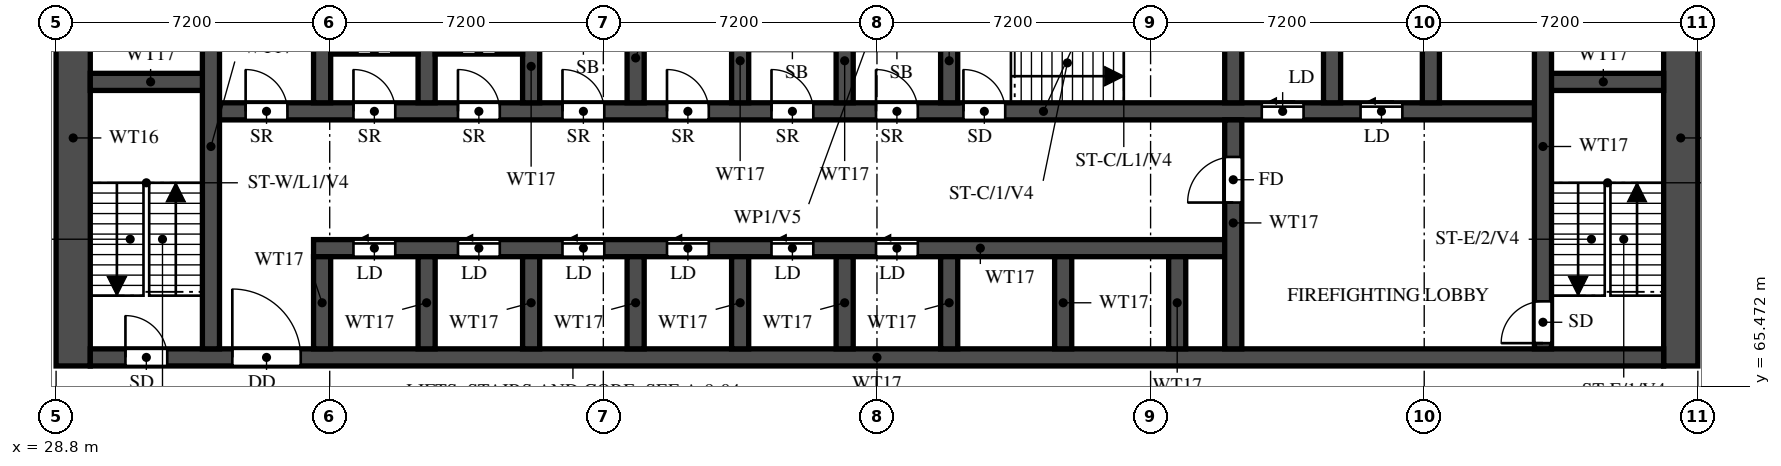
"""IFC4 building model, lengths in metres.
Left out: names, types, materials, properties, quantities, classifications, styles, units other than length and angle.
Written with IfcOpenShell. Run it as: python <this file> out.ifc"""

import sys

from ifc_helpers import new_model, si_unit, direction, frame, frame_2d, origin, place, context, subcontext, project, spatial, rectangle, extrude, element, fill, save


model = new_model("IFC4")
c1 = context("Model", 3, precision=1e-05, world=origin(), true_north=direction((0.0, 1.0)))
c2 = subcontext(c1, "Body", "Model", "MODEL_VIEW")
j1 = project(units=[si_unit("LENGTHUNIT", "METRE"), si_unit("PLANEANGLEUNIT", "RADIAN")], contexts=[c1])
p1 = place(None, origin())
s1 = spatial("IfcSite", under=j1, at=p1, CompositionType="ELEMENT")
p2 = place(p1, origin())
s2 = spatial("IfcBuilding", under=s1, at=p2, CompositionType="ELEMENT")
p3 = place(p2, frame((0.0, 0.0, 13.2)))
s3 = spatial("IfcBuildingStorey", under=s2, at=p3, CompositionType="ELEMENT", Elevation=13.2)
for number, where, z_axis, x_axis in (
    (1, (29.25, 66.0, 0.0), (0.0, 0.0, 1.0), (0.0, 1.0, 0.0)),
    (2, (71.55, 66.0, 0.0), (0.0, 0.0, 1.0), (0.0, 1.0, 0.0)),
):
    element("IfcWall", number, at=place(p3, frame(where, z_axis=z_axis, x_axis=x_axis)), inside=s3, PredefinedType="SHEAR", context=c2, shape_type="SweptSolid", body=[
        extrude(rectangle(XDim=12.0, YDim=0.9, at=frame_2d((6.0, 0.0))), origin(), (0.0, 0.0, 1.0), 3.8),
    ])
p4 = place(p3, frame((29.7, 66.225, 0.0), z_axis=(0.0, 0.0, 1.0), x_axis=(1.0, 0.0, 0.0)))
e3 = element("IfcWall", 3, at=p4, inside=s3, PredefinedType="SHEAR", context=c2, shape_type="SweptSolid", body=[
    extrude(rectangle(XDim=41.4, YDim=0.45, at=frame_2d((20.7, 0.0))), origin(), (0.0, 0.0, 1.0), 3.8),
])
p5 = place(p4, frame((0.925, 0.0, 0.0)))
e4 = element("IfcOpeningElement", 4, at=p5, cuts=e3, PredefinedType="OPENING", context=c2, shape_type="SweptSolid", body=[
    extrude(rectangle(XDim=1.1, YDim=2.1, at=frame_2d((0.55, 1.05))), frame((0.0, 0.235, 0.0), z_axis=(0.0, -1.0, 0.0), x_axis=(1.0, 0.0, 0.0)), (0.0, 0.0, 1.0), 0.47),
])
p6 = place(p4, frame((3.738, 0.0, 0.0)))
e5 = element("IfcOpeningElement", 5, at=p6, cuts=e3, PredefinedType="OPENING", context=c2, shape_type="SweptSolid", body=[
    extrude(rectangle(XDim=1.8, YDim=2.1, at=frame_2d((0.9, 1.05))), frame((0.0, 0.235, 0.0), z_axis=(0.0, -1.0, 0.0), x_axis=(1.0, 0.0, 0.0)), (0.0, 0.0, 1.0), 0.47),
])
p7 = place(p3, frame((35.575, 69.1, 0.0), z_axis=(0.0, 0.0, 1.0), x_axis=(1.0, 0.0, 0.0)))
e6 = element("IfcWall", 6, at=p7, inside=s3, PredefinedType="SHEAR", context=c2, shape_type="SweptSolid", body=[
    extrude(rectangle(XDim=24.2, YDim=0.45, at=frame_2d((12.1, 0.0))), origin(), (0.0, 0.0, 1.0), 3.8),
])
p8 = place(p7, frame((1.05, 0.0, 0.0)))
e7 = element("IfcOpeningElement", 7, at=p8, cuts=e6, PredefinedType="OPENING", context=c2, shape_type="SweptSolid", body=[
    extrude(rectangle(XDim=1.1, YDim=2.1, at=frame_2d((0.55, 1.05))), frame((0.0, 0.235, 0.0), z_axis=(0.0, -1.0, 0.0), x_axis=(1.0, 0.0, 0.0)), (0.0, 0.0, 1.0), 0.47),
])
p9 = place(p7, frame((3.8, 0.0, 0.0)))
e8 = element("IfcOpeningElement", 8, at=p9, cuts=e6, PredefinedType="OPENING", context=c2, shape_type="SweptSolid", body=[
    extrude(rectangle(XDim=1.1, YDim=2.1, at=frame_2d((0.55, 1.05))), frame((0.0, 0.235, 0.0), z_axis=(0.0, -1.0, 0.0), x_axis=(1.0, 0.0, 0.0)), (0.0, 0.0, 1.0), 0.47),
])
p10 = place(p7, frame((6.55, 0.0, 0.0)))
e9 = element("IfcOpeningElement", 9, at=p10, cuts=e6, PredefinedType="OPENING", context=c2, shape_type="SweptSolid", body=[
    extrude(rectangle(XDim=1.1, YDim=2.1, at=frame_2d((0.55, 1.05))), frame((0.0, 0.235, 0.0), z_axis=(0.0, -1.0, 0.0), x_axis=(1.0, 0.0, 0.0)), (0.0, 0.0, 1.0), 0.47),
])
p11 = place(p7, frame((9.3, 0.0, 0.0)))
e10 = element("IfcOpeningElement", 10, at=p11, cuts=e6, PredefinedType="OPENING", context=c2, shape_type="SweptSolid", body=[
    extrude(rectangle(XDim=1.1, YDim=2.1, at=frame_2d((0.55, 1.05))), frame((0.0, 0.235, 0.0), z_axis=(0.0, -1.0, 0.0), x_axis=(1.0, 0.0, 0.0)), (0.0, 0.0, 1.0), 0.47),
])
p12 = place(p7, frame((12.05, 0.0, 0.0)))
e11 = element("IfcOpeningElement", 11, at=p12, cuts=e6, PredefinedType="OPENING", context=c2, shape_type="SweptSolid", body=[
    extrude(rectangle(XDim=1.1, YDim=2.1, at=frame_2d((0.55, 1.05))), frame((0.0, 0.235, 0.0), z_axis=(0.0, -1.0, 0.0), x_axis=(1.0, 0.0, 0.0)), (0.0, 0.0, 1.0), 0.47),
])
p13 = place(p7, frame((14.8, 0.0, 0.0)))
e12 = element("IfcOpeningElement", 12, at=p13, cuts=e6, PredefinedType="OPENING", context=c2, shape_type="SweptSolid", body=[
    extrude(rectangle(XDim=1.1, YDim=2.1, at=frame_2d((0.55, 1.05))), frame((0.0, 0.235, 0.0), z_axis=(0.0, -1.0, 0.0), x_axis=(1.0, 0.0, 0.0)), (0.0, 0.0, 1.0), 0.47),
])
p14 = place(p3, frame((32.875, 72.7, 0.0), z_axis=(0.0, 0.0, 1.0), x_axis=(1.0, 0.0, 0.0)))
e13 = element("IfcWall", 13, at=p14, inside=s3, PredefinedType="SHEAR", context=c2, shape_type="SweptSolid", body=[
    extrude(rectangle(XDim=35.05, YDim=0.45, at=frame_2d((17.525, 0.0))), origin(), (0.0, 0.0, 1.0), 3.8),
])
p15 = place(p14, frame((19.8, 0.0, 0.0)))
e14 = element("IfcOpeningElement", 14, at=p15, cuts=e13, PredefinedType="OPENING", context=c2, shape_type="SweptSolid", body=[
    extrude(rectangle(XDim=1.1, YDim=2.1, at=frame_2d((0.55, 1.05))), frame((0.0, 0.235, 0.0), z_axis=(0.0, -1.0, 0.0), x_axis=(1.0, 0.0, 0.0)), (0.0, 0.0, 1.0), 0.47),
])
p16 = place(p14, frame((27.65, 0.0, 0.0)))
e15 = element("IfcOpeningElement", 15, at=p16, cuts=e13, PredefinedType="OPENING", context=c2, shape_type="SweptSolid", body=[
    extrude(rectangle(XDim=1.1, YDim=2.1, at=frame_2d((0.55, 1.05))), frame((0.0, 0.235, 0.0), z_axis=(0.0, -1.0, 0.0), x_axis=(1.0, 0.0, 0.0)), (0.0, 0.0, 1.0), 0.47),
])
p17 = place(p14, frame((30.25, 0.0, 0.0)))
e16 = element("IfcOpeningElement", 16, at=p17, cuts=e13, PredefinedType="OPENING", context=c2, shape_type="SweptSolid", body=[
    extrude(rectangle(XDim=1.1, YDim=2.1, at=frame_2d((0.55, 1.05))), frame((0.0, 0.235, 0.0), z_axis=(0.0, -1.0, 0.0), x_axis=(1.0, 0.0, 0.0)), (0.0, 0.0, 1.0), 0.47),
])
p18 = place(p14, frame((3.75, 0.0, 0.0)))
e17 = element("IfcOpeningElement", 17, at=p18, cuts=e13, PredefinedType="OPENING", context=c2, shape_type="SweptSolid", body=[
    extrude(rectangle(XDim=1.1, YDim=2.1, at=frame_2d((0.55, 1.05))), frame((0.0, 0.235, 0.0), z_axis=(0.0, -1.0, 0.0), x_axis=(1.0, 0.0, 0.0)), (0.0, 0.0, 1.0), 0.47),
])
p19 = place(p14, frame((6.5, 0.0, 0.0)))
e18 = element("IfcOpeningElement", 18, at=p19, cuts=e13, PredefinedType="OPENING", context=c2, shape_type="SweptSolid", body=[
    extrude(rectangle(XDim=1.1, YDim=2.1, at=frame_2d((0.55, 1.05))), frame((0.0, 0.235, 0.0), z_axis=(0.0, -1.0, 0.0), x_axis=(1.0, 0.0, 0.0)), (0.0, 0.0, 1.0), 0.47),
])
p20 = place(p14, frame((9.25, 0.0, 0.0)))
e19 = element("IfcOpeningElement", 19, at=p20, cuts=e13, PredefinedType="OPENING", context=c2, shape_type="SweptSolid", body=[
    extrude(rectangle(XDim=1.1, YDim=2.1, at=frame_2d((0.55, 1.05))), frame((0.0, 0.235, 0.0), z_axis=(0.0, -1.0, 0.0), x_axis=(1.0, 0.0, 0.0)), (0.0, 0.0, 1.0), 0.47),
])
p21 = place(p14, frame((12.0, 0.0, 0.0)))
e20 = element("IfcOpeningElement", 20, at=p21, cuts=e13, PredefinedType="OPENING", context=c2, shape_type="SweptSolid", body=[
    extrude(rectangle(XDim=1.1, YDim=2.1, at=frame_2d((0.55, 1.05))), frame((0.0, 0.235, 0.0), z_axis=(0.0, -1.0, 0.0), x_axis=(1.0, 0.0, 0.0)), (0.0, 0.0, 1.0), 0.47),
])
p22 = place(p14, frame((14.75, 0.0, 0.0)))
e21 = element("IfcOpeningElement", 21, at=p22, cuts=e13, PredefinedType="OPENING", context=c2, shape_type="SweptSolid", body=[
    extrude(rectangle(XDim=1.1, YDim=2.1, at=frame_2d((0.55, 1.05))), frame((0.0, 0.235, 0.0), z_axis=(0.0, -1.0, 0.0), x_axis=(1.0, 0.0, 0.0)), (0.0, 0.0, 1.0), 0.47),
])
p23 = place(p14, frame((17.5, 0.0, 0.0)))
e22 = element("IfcOpeningElement", 22, at=p23, cuts=e13, PredefinedType="OPENING", context=c2, shape_type="SweptSolid", body=[
    extrude(rectangle(XDim=1.1, YDim=2.1, at=frame_2d((0.55, 1.05))), frame((0.0, 0.235, 0.0), z_axis=(0.0, -1.0, 0.0), x_axis=(1.0, 0.0, 0.0)), (0.0, 0.0, 1.0), 0.47),
])
p24 = place(p14, frame((0.913, 0.0, 0.0)))
e23 = element("IfcOpeningElement", 23, at=p24, cuts=e13, PredefinedType="OPENING", context=c2, shape_type="SweptSolid", body=[
    extrude(rectangle(XDim=1.1, YDim=2.1, at=frame_2d((0.55, 1.05))), frame((0.0, 0.235, 0.0), z_axis=(0.0, -1.0, 0.0), x_axis=(1.0, 0.0, 0.0)), (0.0, 0.0, 1.0), 0.47),
])
for number, where, z_axis, x_axis in (
    (24, (29.7, 73.475, 0.0), (0.0, 0.0, 1.0), (1.0, 0.0, 0.0)),
    (25, (67.925, 73.475, 0.0), (0.0, 0.0, 1.0), (1.0, 0.0, 0.0)),
):
    element("IfcWall", number, at=place(p3, frame(where, z_axis=z_axis, x_axis=x_axis)), inside=s3, PredefinedType="SHEAR", context=c2, shape_type="SweptSolid", body=[
        extrude(rectangle(XDim=3.175, YDim=0.45, at=frame_2d((1.587, 0.0))), origin(), (0.0, 0.0, 1.0), 3.8),
    ])
p25 = place(p3, frame((32.875, 66.45, 0.0), z_axis=(0.0, 0.0, 1.0), x_axis=(0.0, 1.0, 0.0)))
e26 = element("IfcWall", 26, at=p25, inside=s3, PredefinedType="SHEAR", context=c2, shape_type="SweptSolid", body=[
    extrude(rectangle(XDim=10.65, YDim=0.45, at=frame_2d((5.325, 0.0))), origin(), (0.0, 0.0, 1.0), 3.8),
])
p26 = place(p3, frame((67.925, 66.45, 0.0), z_axis=(0.0, 0.0, 1.0), x_axis=(0.0, 1.0, 0.0)))
e27 = element("IfcWall", 27, at=p26, inside=s3, PredefinedType="SHEAR", context=c2, shape_type="SweptSolid", body=[
    extrude(rectangle(XDim=10.65, YDim=0.45, at=frame_2d((5.325, 0.0))), origin(), (0.0, 0.0, 1.0), 3.8),
])
p27 = place(p26, frame((0.15, 0.0, 0.0)))
e28 = element("IfcOpeningElement", 28, at=p27, cuts=e27, PredefinedType="OPENING", context=c2, shape_type="SweptSolid", body=[
    extrude(rectangle(XDim=1.1, YDim=2.1, at=frame_2d((0.55, 1.05))), frame((0.0, 0.235, 0.0), z_axis=(0.0, -1.0, 0.0), x_axis=(1.0, 0.0, 0.0)), (0.0, 0.0, 1.0), 0.47),
])
p28 = place(p3, frame((59.775, 66.45, 0.0), z_axis=(0.0, 0.0, 1.0), x_axis=(0.0, 1.0, 0.0)))
e29 = element("IfcWall", 29, at=p28, inside=s3, PredefinedType="SHEAR", context=c2, shape_type="SweptSolid", body=[
    extrude(rectangle(XDim=6.025, YDim=0.45, at=frame_2d((3.013, 0.0))), origin(), (0.0, 0.0, 1.0), 3.8),
])
p29 = place(p28, frame((3.85, 0.0, 0.0)))
e30 = element("IfcOpeningElement", 30, at=p29, cuts=e29, PredefinedType="OPENING", context=c2, shape_type="SweptSolid", body=[
    extrude(rectangle(XDim=1.2, YDim=2.1, at=frame_2d((0.6, 1.05))), frame((0.0, 0.235, 0.0), z_axis=(0.0, -1.0, 0.0), x_axis=(1.0, 0.0, 0.0)), (0.0, 0.0, 1.0), 0.47),
])
p30 = place(p3, frame((59.775, 72.925, 0.0), z_axis=(0.0, 0.0, 1.0), x_axis=(0.0, 1.0, 0.0)))
e31 = element("IfcWall", 31, at=p30, inside=s3, PredefinedType="SHEAR", context=c2, shape_type="SweptSolid", body=[
    extrude(rectangle(XDim=2.95, YDim=0.45, at=frame_2d((1.475, 0.0))), origin(), (0.0, 0.0, 1.0), 3.8),
])
for number, where, z_axis, x_axis in (
    (32, (35.8, 66.45, 0.0), (0.0, 0.0, 1.0), (0.0, 1.0, 0.0)),
    (33, (38.55, 66.45, 0.0), (0.0, 0.0, 1.0), (0.0, 1.0, 0.0)),
    (34, (41.3, 66.45, 0.0), (0.0, 0.0, 1.0), (0.0, 1.0, 0.0)),
    (35, (44.05, 66.45, 0.0), (0.0, 0.0, 1.0), (0.0, 1.0, 0.0)),
    (36, (46.8, 66.45, 0.0), (0.0, 0.0, 1.0), (0.0, 1.0, 0.0)),
    (37, (49.55, 66.45, 0.0), (0.0, 0.0, 1.0), (0.0, 1.0, 0.0)),
    (38, (52.3, 66.45, 0.0), (0.0, 0.0, 1.0), (0.0, 1.0, 0.0)),
    (39, (55.3, 66.45, 0.0), (0.0, 0.0, 1.0), (0.0, 1.0, 0.0)),
    (40, (58.3, 66.45, 0.0), (0.0, 0.0, 1.0), (0.0, 1.0, 0.0)),
):
    element("IfcWall", number, at=place(p3, frame(where, z_axis=z_axis, x_axis=x_axis)), inside=s3, PredefinedType="SHEAR", context=c2, shape_type="SweptSolid", body=[
        extrude(rectangle(XDim=2.425, YDim=0.45, at=frame_2d((1.212, 0.0))), origin(), (0.0, 0.0, 1.0), 3.8),
    ])
for number, where, z_axis, x_axis in (
    (41, (35.8, 72.925, 0.0), (0.0, 0.0, 1.0), (0.0, 1.0, 0.0)),
    (42, (38.55, 72.925, 0.0), (0.0, 0.0, 1.0), (0.0, 1.0, 0.0)),
    (43, (41.3, 72.925, 0.0), (0.0, 0.0, 1.0), (0.0, 1.0, 0.0)),
    (44, (44.05, 72.925, 0.0), (0.0, 0.0, 1.0), (0.0, 1.0, 0.0)),
    (45, (46.8, 72.925, 0.0), (0.0, 0.0, 1.0), (0.0, 1.0, 0.0)),
    (46, (49.55, 72.925, 0.0), (0.0, 0.0, 1.0), (0.0, 1.0, 0.0)),
    (47, (52.3, 72.925, 0.0), (0.0, 0.0, 1.0), (0.0, 1.0, 0.0)),
    (48, (62.375, 72.925, 0.0), (0.0, 0.0, 1.0), (0.0, 1.0, 0.0)),
    (49, (64.975, 72.925, 0.0), (0.0, 0.0, 1.0), (0.0, 1.0, 0.0)),
):
    element("IfcWall", number, at=place(p3, frame(where, z_axis=z_axis, x_axis=x_axis)), inside=s3, PredefinedType="SHEAR", context=c2, shape_type="SweptSolid", body=[
        extrude(rectangle(XDim=2.95, YDim=0.45, at=frame_2d((1.475, 0.0))), origin(), (0.0, 0.0, 1.0), 3.8),
    ])
p31 = place(p3, frame((36.025, 74.282, 0.0), z_axis=(0.0, 0.0, 1.0), x_axis=(1.0, 0.0, 0.0)))
e50 = element("IfcWall", 50, at=p31, inside=s3, PredefinedType="PARTITIONING", context=c2, shape_type="SweptSolid", body=[
    extrude(rectangle(XDim=2.3, YDim=0.15, at=frame_2d((1.15, 0.0))), origin(), (0.0, 0.0, 1.0), 3.8),
])
p32 = place(p31, frame((0.7, 0.0, 0.0)))
e51 = element("IfcOpeningElement", 51, at=p32, cuts=e50, PredefinedType="OPENING", context=c2, shape_type="SweptSolid", body=[
    extrude(rectangle(XDim=0.9, YDim=2.1, at=frame_2d((0.45, 1.05))), frame((0.0, 0.085, 0.0), z_axis=(0.0, -1.0, 0.0), x_axis=(1.0, 0.0, 0.0)), (0.0, 0.0, 1.0), 0.17),
])
p33 = place(p3, frame((38.775, 74.282, 0.0), z_axis=(0.0, 0.0, 1.0), x_axis=(1.0, 0.0, 0.0)))
e52 = element("IfcWall", 52, at=p33, inside=s3, PredefinedType="PARTITIONING", context=c2, shape_type="SweptSolid", body=[
    extrude(rectangle(XDim=2.3, YDim=0.15, at=frame_2d((1.15, 0.0))), origin(), (0.0, 0.0, 1.0), 3.8),
])
p34 = place(p33, frame((0.7, 0.0, 0.0)))
e53 = element("IfcOpeningElement", 53, at=p34, cuts=e52, PredefinedType="OPENING", context=c2, shape_type="SweptSolid", body=[
    extrude(rectangle(XDim=0.9, YDim=2.1, at=frame_2d((0.45, 1.05))), frame((0.0, 0.085, 0.0), z_axis=(0.0, -1.0, 0.0), x_axis=(1.0, 0.0, 0.0)), (0.0, 0.0, 1.0), 0.17),
])
p35 = place(p5, origin())
e54 = element("IfcDoor", 54, at=p35, inside=s3, OperationType="SINGLE_SWING_LEFT", PredefinedType="DOOR", context=c2, shape_type="SweptSolid", body=[
    extrude(rectangle(XDim=1.1, YDim=2.1, at=frame_2d((0.55, 1.05))), frame((0.0, 0.025, 0.0), z_axis=(0.0, -1.0, 0.0), x_axis=(1.0, 0.0, 0.0)), (0.0, 0.0, 1.0), 0.05),
])
fill(e4, e54)
p36 = place(p15, origin())
e55 = element("IfcDoor", 55, at=p36, inside=s3, OperationType="SINGLE_SWING_LEFT", PredefinedType="DOOR", context=c2, shape_type="SweptSolid", body=[
    extrude(rectangle(XDim=1.1, YDim=2.1, at=frame_2d((0.55, 1.05))), frame((0.0, 0.025, 0.0), z_axis=(0.0, -1.0, 0.0), x_axis=(1.0, 0.0, 0.0)), (0.0, 0.0, 1.0), 0.05),
])
fill(e14, e55)
p37 = place(p27, origin())
e56 = element("IfcDoor", 56, at=p37, inside=s3, OperationType="SINGLE_SWING_LEFT", PredefinedType="DOOR", context=c2, shape_type="SweptSolid", body=[
    extrude(rectangle(XDim=1.1, YDim=2.1, at=frame_2d((0.55, 1.05))), frame((0.0, 0.025, 0.0), z_axis=(0.0, -1.0, 0.0), x_axis=(1.0, 0.0, 0.0)), (0.0, 0.0, 1.0), 0.05),
])
fill(e28, e56)
p38 = place(p6, origin())
e57 = element("IfcDoor", 57, at=p38, inside=s3, OperationType="DOUBLE_DOOR_SINGLE_SWING", PredefinedType="DOOR", context=c2, shape_type="SweptSolid", body=[
    extrude(rectangle(XDim=1.8, YDim=2.1, at=frame_2d((0.9, 1.05))), frame((0.0, 0.025, 0.0), z_axis=(0.0, -1.0, 0.0), x_axis=(1.0, 0.0, 0.0)), (0.0, 0.0, 1.0), 0.05),
])
fill(e5, e57)
p39 = place(p29, origin())
e58 = element("IfcDoor", 58, at=p39, inside=s3, OperationType="SINGLE_SWING_RIGHT", PredefinedType="DOOR", context=c2, shape_type="SweptSolid", body=[
    extrude(rectangle(XDim=1.2, YDim=2.1, at=frame_2d((0.6, 1.05))), frame((0.0, 0.025, 0.0), z_axis=(0.0, -1.0, 0.0), x_axis=(1.0, 0.0, 0.0)), (0.0, 0.0, 1.0), 0.05),
])
fill(e30, e58)
p40 = place(p16, origin())
e59 = element("IfcDoor", 59, at=p40, inside=s3, OperationType="SLIDING_TO_LEFT", PredefinedType="DOOR", context=c2, shape_type="SweptSolid", body=[
    extrude(rectangle(XDim=1.1, YDim=2.1, at=frame_2d((0.55, 1.05))), frame((0.0, 0.025, 0.0), z_axis=(0.0, -1.0, 0.0), x_axis=(1.0, 0.0, 0.0)), (0.0, 0.0, 1.0), 0.05),
])
fill(e15, e59)
p41 = place(p17, origin())
e60 = element("IfcDoor", 60, at=p41, inside=s3, OperationType="SLIDING_TO_LEFT", PredefinedType="DOOR", context=c2, shape_type="SweptSolid", body=[
    extrude(rectangle(XDim=1.1, YDim=2.1, at=frame_2d((0.55, 1.05))), frame((0.0, 0.025, 0.0), z_axis=(0.0, -1.0, 0.0), x_axis=(1.0, 0.0, 0.0)), (0.0, 0.0, 1.0), 0.05),
])
fill(e16, e60)
p42 = place(p8, origin())
e61 = element("IfcDoor", 61, at=p42, inside=s3, OperationType="SLIDING_TO_LEFT", PredefinedType="DOOR", context=c2, shape_type="SweptSolid", body=[
    extrude(rectangle(XDim=1.1, YDim=2.1, at=frame_2d((0.55, 1.05))), frame((0.0, 0.025, 0.0), z_axis=(0.0, -1.0, 0.0), x_axis=(1.0, 0.0, 0.0)), (0.0, 0.0, 1.0), 0.05),
])
fill(e7, e61)
p43 = place(p9, origin())
e62 = element("IfcDoor", 62, at=p43, inside=s3, OperationType="SLIDING_TO_LEFT", PredefinedType="DOOR", context=c2, shape_type="SweptSolid", body=[
    extrude(rectangle(XDim=1.1, YDim=2.1, at=frame_2d((0.55, 1.05))), frame((0.0, 0.025, 0.0), z_axis=(0.0, -1.0, 0.0), x_axis=(1.0, 0.0, 0.0)), (0.0, 0.0, 1.0), 0.05),
])
fill(e8, e62)
p44 = place(p10, origin())
e63 = element("IfcDoor", 63, at=p44, inside=s3, OperationType="SLIDING_TO_LEFT", PredefinedType="DOOR", context=c2, shape_type="SweptSolid", body=[
    extrude(rectangle(XDim=1.1, YDim=2.1, at=frame_2d((0.55, 1.05))), frame((0.0, 0.025, 0.0), z_axis=(0.0, -1.0, 0.0), x_axis=(1.0, 0.0, 0.0)), (0.0, 0.0, 1.0), 0.05),
])
fill(e9, e63)
p45 = place(p11, origin())
e64 = element("IfcDoor", 64, at=p45, inside=s3, OperationType="SLIDING_TO_LEFT", PredefinedType="DOOR", context=c2, shape_type="SweptSolid", body=[
    extrude(rectangle(XDim=1.1, YDim=2.1, at=frame_2d((0.55, 1.05))), frame((0.0, 0.025, 0.0), z_axis=(0.0, -1.0, 0.0), x_axis=(1.0, 0.0, 0.0)), (0.0, 0.0, 1.0), 0.05),
])
fill(e10, e64)
p46 = place(p12, origin())
e65 = element("IfcDoor", 65, at=p46, inside=s3, OperationType="SLIDING_TO_LEFT", PredefinedType="DOOR", context=c2, shape_type="SweptSolid", body=[
    extrude(rectangle(XDim=1.1, YDim=2.1, at=frame_2d((0.55, 1.05))), frame((0.0, 0.025, 0.0), z_axis=(0.0, -1.0, 0.0), x_axis=(1.0, 0.0, 0.0)), (0.0, 0.0, 1.0), 0.05),
])
fill(e11, e65)
p47 = place(p13, origin())
e66 = element("IfcDoor", 66, at=p47, inside=s3, OperationType="SLIDING_TO_LEFT", PredefinedType="DOOR", context=c2, shape_type="SweptSolid", body=[
    extrude(rectangle(XDim=1.1, YDim=2.1, at=frame_2d((0.55, 1.05))), frame((0.0, 0.025, 0.0), z_axis=(0.0, -1.0, 0.0), x_axis=(1.0, 0.0, 0.0)), (0.0, 0.0, 1.0), 0.05),
])
fill(e12, e66)
p48 = place(p18, origin())
e67 = element("IfcDoor", 67, at=p48, inside=s3, OperationType="SINGLE_SWING_LEFT", PredefinedType="DOOR", context=c2, shape_type="SweptSolid", body=[
    extrude(rectangle(XDim=1.1, YDim=2.1, at=frame_2d((0.55, 1.05))), frame((0.0, 0.025, 0.0), z_axis=(0.0, -1.0, 0.0), x_axis=(1.0, 0.0, 0.0)), (0.0, 0.0, 1.0), 0.05),
])
fill(e17, e67)
p49 = place(p19, origin())
e68 = element("IfcDoor", 68, at=p49, inside=s3, OperationType="SINGLE_SWING_LEFT", PredefinedType="DOOR", context=c2, shape_type="SweptSolid", body=[
    extrude(rectangle(XDim=1.1, YDim=2.1, at=frame_2d((0.55, 1.05))), frame((0.0, 0.025, 0.0), z_axis=(0.0, -1.0, 0.0), x_axis=(1.0, 0.0, 0.0)), (0.0, 0.0, 1.0), 0.05),
])
fill(e18, e68)
p50 = place(p20, origin())
e69 = element("IfcDoor", 69, at=p50, inside=s3, OperationType="SINGLE_SWING_LEFT", PredefinedType="DOOR", context=c2, shape_type="SweptSolid", body=[
    extrude(rectangle(XDim=1.1, YDim=2.1, at=frame_2d((0.55, 1.05))), frame((0.0, 0.025, 0.0), z_axis=(0.0, -1.0, 0.0), x_axis=(1.0, 0.0, 0.0)), (0.0, 0.0, 1.0), 0.05),
])
fill(e19, e69)
p51 = place(p21, origin())
e70 = element("IfcDoor", 70, at=p51, inside=s3, OperationType="SINGLE_SWING_LEFT", PredefinedType="DOOR", context=c2, shape_type="SweptSolid", body=[
    extrude(rectangle(XDim=1.1, YDim=2.1, at=frame_2d((0.55, 1.05))), frame((0.0, 0.025, 0.0), z_axis=(0.0, -1.0, 0.0), x_axis=(1.0, 0.0, 0.0)), (0.0, 0.0, 1.0), 0.05),
])
fill(e20, e70)
p52 = place(p22, origin())
e71 = element("IfcDoor", 71, at=p52, inside=s3, OperationType="SINGLE_SWING_LEFT", PredefinedType="DOOR", context=c2, shape_type="SweptSolid", body=[
    extrude(rectangle(XDim=1.1, YDim=2.1, at=frame_2d((0.55, 1.05))), frame((0.0, 0.025, 0.0), z_axis=(0.0, -1.0, 0.0), x_axis=(1.0, 0.0, 0.0)), (0.0, 0.0, 1.0), 0.05),
])
fill(e21, e71)
p53 = place(p23, origin())
e72 = element("IfcDoor", 72, at=p53, inside=s3, OperationType="SINGLE_SWING_LEFT", PredefinedType="DOOR", context=c2, shape_type="SweptSolid", body=[
    extrude(rectangle(XDim=1.1, YDim=2.1, at=frame_2d((0.55, 1.05))), frame((0.0, 0.025, 0.0), z_axis=(0.0, -1.0, 0.0), x_axis=(1.0, 0.0, 0.0)), (0.0, 0.0, 1.0), 0.05),
])
fill(e22, e72)
p54 = place(p24, origin())
e73 = element("IfcDoor", 73, at=p54, inside=s3, OperationType="SINGLE_SWING_LEFT", PredefinedType="DOOR", context=c2, shape_type="SweptSolid", body=[
    extrude(rectangle(XDim=1.1, YDim=2.1, at=frame_2d((0.55, 1.05))), frame((0.0, 0.025, 0.0), z_axis=(0.0, -1.0, 0.0), x_axis=(1.0, 0.0, 0.0)), (0.0, 0.0, 1.0), 0.05),
])
fill(e23, e73)
save(model, sys.argv[1])
